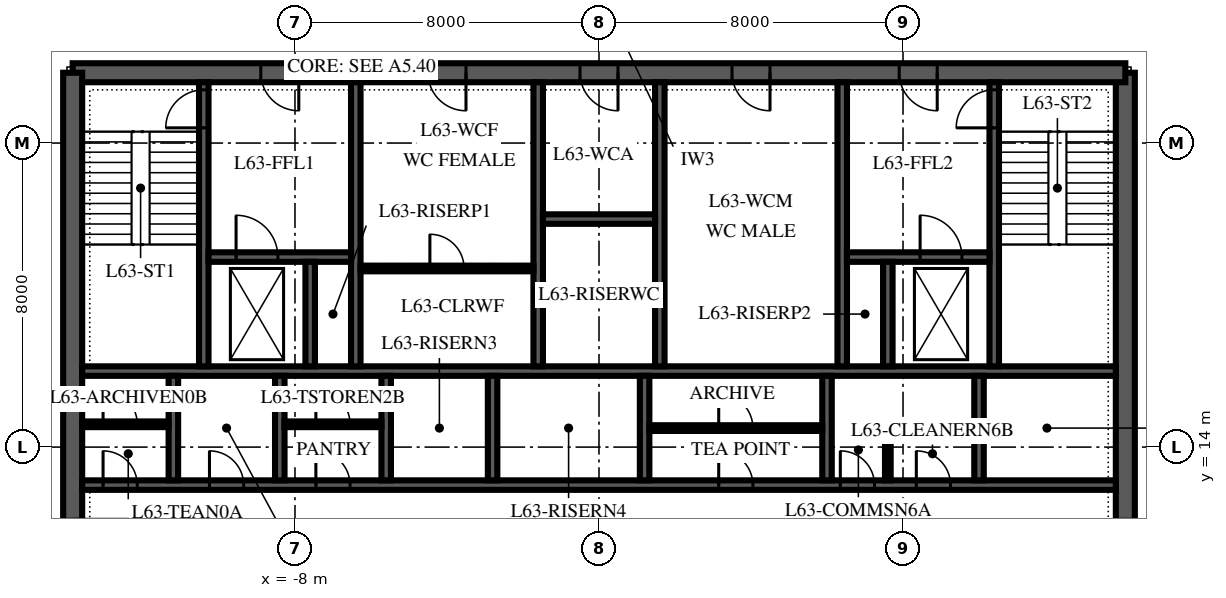
"""IFC4 building model, lengths in metres.
Left out: names, types, materials, properties, quantities, classifications, styles, units other than length and angle.
Written with IfcOpenShell. Run it as: python <this file> out.ifc"""

import sys

from ifc_helpers import new_model, si_unit, direction, frame, frame_2d, origin, place, context, subcontext, project, spatial, polyline, rectangle, outline, extrude, element, fill, save


model = new_model("IFC4")
c1 = context("Model", 3, precision=1e-05, world=origin(), true_north=direction((0.0, 1.0)))
c2 = subcontext(c1, "Body", "Model", "MODEL_VIEW")
j1 = project(units=[si_unit("LENGTHUNIT", "METRE"), si_unit("PLANEANGLEUNIT", "RADIAN")], contexts=[c1])
p1 = place(None, origin())
s1 = spatial("IfcSite", under=j1, at=p1, CompositionType="ELEMENT")
p2 = place(p1, origin())
s2 = spatial("IfcBuilding", under=s1, at=p2, CompositionType="ELEMENT")
p3 = place(p2, frame((0.0, 0.0, 272.0)))
s3 = spatial("IfcBuildingStorey", under=s2, at=p3, CompositionType="ELEMENT", Elevation=272.0)
p4 = place(p3, frame((13.85, 6.15, 0.0), z_axis=(0.0, 0.0, 1.0), x_axis=(0.0, 1.0, 0.0)))
e1 = element("IfcWall", 1, at=p4, inside=s3, PredefinedType="SHEAR", context=c2, shape_type="SweptSolid", body=[
    extrude(outline(polyline([(0.0, -0.25), (17.7, -0.25), (17.7, 0.0), (17.45, 0.0), (17.45, 0.25), (0.25, 0.25), (0.25, 0.0), (0.0, 0.0), (0.0, -0.25)])), origin(), (0.0, 0.0, 1.0), 4.0),
])
p5 = place(p4, frame((4.15, 0.0, 0.0)))
e2 = element("IfcOpeningElement", 2, at=p5, cuts=e1, PredefinedType="OPENING", context=c2, shape_type="SweptSolid", body=[
    extrude(rectangle(XDim=1.8, YDim=2.4, at=frame_2d((0.9, 1.2))), frame((0.0, 0.265, 0.0), z_axis=(0.0, -1.0, 0.0), x_axis=(1.0, 0.0, 0.0)), (0.0, 0.0, 1.0), 0.53),
])
p6 = place(p3, frame((13.85, 23.85, 0.0), z_axis=(0.0, 0.0, 1.0), x_axis=(-1.0, 0.0, 0.0)))
e3 = element("IfcWall", 3, at=p6, inside=s3, PredefinedType="SHEAR", context=c2, shape_type="SweptSolid", body=[
    extrude(rectangle(XDim=27.7, YDim=0.5, at=frame_2d((13.85, 0.0))), origin(), (0.0, 0.0, 1.0), 4.0),
])
p7 = place(p6, frame((21.75, 0.0, 0.0)))
e4 = element("IfcOpeningElement", 4, at=p7, cuts=e3, PredefinedType="OPENING", context=c2, shape_type="SweptSolid", body=[
    extrude(rectangle(XDim=1.0, YDim=2.1, at=frame_2d((0.5, 1.05))), frame((0.0, 0.265, 0.0), z_axis=(0.0, -1.0, 0.0), x_axis=(1.0, 0.0, 0.0)), (0.0, 0.0, 1.0), 0.53),
])
p8 = place(p6, frame((4.95, 0.0, 0.0)))
e5 = element("IfcOpeningElement", 5, at=p8, cuts=e3, PredefinedType="OPENING", context=c2, shape_type="SweptSolid", body=[
    extrude(rectangle(XDim=1.0, YDim=2.1, at=frame_2d((0.5, 1.05))), frame((0.0, 0.265, 0.0), z_axis=(0.0, -1.0, 0.0), x_axis=(1.0, 0.0, 0.0)), (0.0, 0.0, 1.0), 0.53),
])
p9 = place(p6, frame((17.35, 0.0, 0.0)))
e6 = element("IfcOpeningElement", 6, at=p9, cuts=e3, PredefinedType="OPENING", context=c2, shape_type="SweptSolid", body=[
    extrude(rectangle(XDim=1.0, YDim=2.1, at=frame_2d((0.5, 1.05))), frame((0.0, 0.265, 0.0), z_axis=(0.0, -1.0, 0.0), x_axis=(1.0, 0.0, 0.0)), (0.0, 0.0, 1.0), 0.53),
])
p10 = place(p6, frame((13.35, 0.0, 0.0)))
e7 = element("IfcOpeningElement", 7, at=p10, cuts=e3, PredefinedType="OPENING", context=c2, shape_type="SweptSolid", body=[
    extrude(rectangle(XDim=1.0, YDim=2.1, at=frame_2d((0.5, 1.05))), frame((0.0, 0.265, 0.0), z_axis=(0.0, -1.0, 0.0), x_axis=(1.0, 0.0, 0.0)), (0.0, 0.0, 1.0), 0.53),
])
p11 = place(p6, frame((9.35, 0.0, 0.0)))
e8 = element("IfcOpeningElement", 8, at=p11, cuts=e3, PredefinedType="OPENING", context=c2, shape_type="SweptSolid", body=[
    extrude(rectangle(XDim=1.0, YDim=2.1, at=frame_2d((0.5, 1.05))), frame((0.0, 0.265, 0.0), z_axis=(0.0, -1.0, 0.0), x_axis=(1.0, 0.0, 0.0)), (0.0, 0.0, 1.0), 0.53),
])
p12 = place(p3, frame((-13.85, 23.85, 0.0), z_axis=(0.0, 0.0, 1.0), x_axis=(0.0, -1.0, 0.0)))
e9 = element("IfcWall", 9, at=p12, inside=s3, PredefinedType="SHEAR", context=c2, shape_type="SweptSolid", body=[
    extrude(outline(polyline([(0.0, -0.25), (17.7, -0.25), (17.7, 0.0), (17.45, 0.0), (17.45, 0.25), (0.25, 0.25), (0.25, 0.0), (0.0, 0.0), (0.0, -0.25)])), origin(), (0.0, 0.0, 1.0), 4.0),
])
p13 = place(p12, frame((11.75, 0.0, 0.0)))
e10 = element("IfcOpeningElement", 10, at=p13, cuts=e9, PredefinedType="OPENING", context=c2, shape_type="SweptSolid", body=[
    extrude(rectangle(XDim=1.8, YDim=2.4, at=frame_2d((0.9, 1.2))), frame((0.0, 0.265, 0.0), z_axis=(0.0, -1.0, 0.0), x_axis=(1.0, 0.0, 0.0)), (0.0, 0.0, 1.0), 0.53),
])
p14 = place(p3, frame((-13.6, 13.0, 0.0), z_axis=(0.0, 0.0, 1.0), x_axis=(1.0, 0.0, 0.0)))
e11 = element("IfcWall", 11, at=p14, inside=s3, PredefinedType="SHEAR", context=c2, shape_type="SweptSolid", body=[
    extrude(rectangle(XDim=27.2, YDim=0.25, at=frame_2d((13.6, 0.0))), origin(), (0.0, 0.0, 1.0), 4.0),
])
p15 = place(p14, frame((16.75, 0.0, 0.0)))
e12 = element("IfcOpeningElement", 12, at=p15, cuts=e11, PredefinedType="OPENING", context=c2, shape_type="SweptSolid", body=[
    extrude(rectangle(XDim=0.9, YDim=2.1, at=frame_2d((0.45, 1.05))), frame((0.0, 0.14, 0.0), z_axis=(0.0, -1.0, 0.0), x_axis=(1.0, 0.0, 0.0)), (0.0, 0.0, 1.0), 0.28),
])
p16 = place(p14, frame((19.95, 0.0, 0.0)))
e13 = element("IfcOpeningElement", 13, at=p16, cuts=e11, PredefinedType="OPENING", context=c2, shape_type="SweptSolid", body=[
    extrude(rectangle(XDim=0.9, YDim=2.1, at=frame_2d((0.45, 1.05))), frame((0.0, 0.14, 0.0), z_axis=(0.0, -1.0, 0.0), x_axis=(1.0, 0.0, 0.0)), (0.0, 0.0, 1.0), 0.28),
])
p17 = place(p14, frame((21.95, 0.0, 0.0)))
e14 = element("IfcOpeningElement", 14, at=p17, cuts=e11, PredefinedType="OPENING", context=c2, shape_type="SweptSolid", body=[
    extrude(rectangle(XDim=0.9, YDim=2.1, at=frame_2d((0.45, 1.05))), frame((0.0, 0.14, 0.0), z_axis=(0.0, -1.0, 0.0), x_axis=(1.0, 0.0, 0.0)), (0.0, 0.0, 1.0), 0.28),
])
p18 = place(p14, frame((0.55, 0.0, 0.0)))
e15 = element("IfcOpeningElement", 15, at=p18, cuts=e11, PredefinedType="OPENING", context=c2, shape_type="SweptSolid", body=[
    extrude(rectangle(XDim=0.9, YDim=2.1, at=frame_2d((0.45, 1.05))), frame((0.0, 0.14, 0.0), z_axis=(0.0, -1.0, 0.0), x_axis=(1.0, 0.0, 0.0)), (0.0, 0.0, 1.0), 0.28),
])
p19 = place(p14, frame((3.35, 0.0, 0.0)))
e16 = element("IfcOpeningElement", 16, at=p19, cuts=e11, PredefinedType="OPENING", context=c2, shape_type="SweptSolid", body=[
    extrude(rectangle(XDim=0.9, YDim=2.1, at=frame_2d((0.45, 1.05))), frame((0.0, 0.14, 0.0), z_axis=(0.0, -1.0, 0.0), x_axis=(1.0, 0.0, 0.0)), (0.0, 0.0, 1.0), 0.28),
])
p20 = place(p14, frame((6.15, 0.0, 0.0)))
e17 = element("IfcOpeningElement", 17, at=p20, cuts=e11, PredefinedType="OPENING", context=c2, shape_type="SweptSolid", body=[
    extrude(rectangle(XDim=0.9, YDim=2.1, at=frame_2d((0.45, 1.05))), frame((0.0, 0.14, 0.0), z_axis=(0.0, -1.0, 0.0), x_axis=(1.0, 0.0, 0.0)), (0.0, 0.0, 1.0), 0.28),
])
p21 = place(p3, frame((-13.6, 16.0, 0.0), z_axis=(0.0, 0.0, 1.0), x_axis=(1.0, 0.0, 0.0)))
e18 = element("IfcWall", 18, at=p21, inside=s3, PredefinedType="SHEAR", context=c2, shape_type="SweptSolid", body=[
    extrude(rectangle(XDim=27.2, YDim=0.25, at=frame_2d((13.6, 0.0))), origin(), (0.0, 0.0, 1.0), 4.0),
])
for number, where, z_axis, x_axis in (
    (19, (-11.2, 13.125, 0.0), (0.0, 0.0, 1.0), (0.0, 1.0, 0.0)),
    (20, (-8.4, 13.125, 0.0), (0.0, 0.0, 1.0), (0.0, 1.0, 0.0)),
    (21, (-5.6, 13.125, 0.0), (0.0, 0.0, 1.0), (0.0, 1.0, 0.0)),
    (22, (-2.8, 13.125, 0.0), (0.0, 0.0, 1.0), (0.0, 1.0, 0.0)),
    (23, (1.2, 13.125, 0.0), (0.0, 0.0, 1.0), (0.0, 1.0, 0.0)),
    (24, (6.0, 13.125, 0.0), (0.0, 0.0, 1.0), (0.0, 1.0, 0.0)),
    (25, (10.0, 13.125, 0.0), (0.0, 0.0, 1.0), (0.0, 1.0, 0.0)),
):
    element("IfcWall", number, at=place(p3, frame(where, z_axis=z_axis, x_axis=x_axis)), inside=s3, PredefinedType="SHEAR", context=c2, shape_type="SweptSolid", body=[
        extrude(rectangle(XDim=2.75, YDim=0.25, at=frame_2d((1.375, 0.0))), origin(), (0.0, 0.0, 1.0), 4.0),
    ])
p22 = place(p3, frame((-10.4, 16.125, 0.0), z_axis=(0.0, 0.0, 1.0), x_axis=(0.0, 1.0, 0.0)))
e26 = element("IfcWall", 26, at=p22, inside=s3, PredefinedType="SHEAR", context=c2, shape_type="SweptSolid", body=[
    extrude(rectangle(XDim=7.475, YDim=0.25, at=frame_2d((3.738, 0.0))), origin(), (0.0, 0.0, 1.0), 4.0),
])
p23 = place(p22, frame((6.275, 0.0, 0.0)))
e27 = element("IfcOpeningElement", 27, at=p23, cuts=e26, PredefinedType="OPENING", context=c2, shape_type="SweptSolid", body=[
    extrude(rectangle(XDim=1.0, YDim=2.1, at=frame_2d((0.5, 1.05))), frame((0.0, 0.14, 0.0), z_axis=(0.0, -1.0, 0.0), x_axis=(1.0, 0.0, 0.0)), (0.0, 0.0, 1.0), 0.28),
])
for number, where, z_axis, x_axis in (
    (28, (-6.4, 16.125, 0.0), (0.0, 0.0, 1.0), (0.0, 1.0, 0.0)),
    (29, (-1.6, 16.125, 0.0), (0.0, 0.0, 1.0), (0.0, 1.0, 0.0)),
    (30, (1.6, 16.125, 0.0), (0.0, 0.0, 1.0), (0.0, 1.0, 0.0)),
    (31, (6.4, 16.125, 0.0), (0.0, 0.0, 1.0), (0.0, 1.0, 0.0)),
):
    element("IfcWall", number, at=place(p3, frame(where, z_axis=z_axis, x_axis=x_axis)), inside=s3, PredefinedType="SHEAR", context=c2, shape_type="SweptSolid", body=[
        extrude(rectangle(XDim=7.475, YDim=0.25, at=frame_2d((3.738, 0.0))), origin(), (0.0, 0.0, 1.0), 4.0),
    ])
p24 = place(p3, frame((10.4, 16.125, 0.0), z_axis=(0.0, 0.0, 1.0), x_axis=(0.0, 1.0, 0.0)))
e32 = element("IfcWall", 32, at=p24, inside=s3, PredefinedType="SHEAR", context=c2, shape_type="SweptSolid", body=[
    extrude(rectangle(XDim=7.475, YDim=0.25, at=frame_2d((3.738, 0.0))), origin(), (0.0, 0.0, 1.0), 4.0),
])
p25 = place(p24, frame((6.275, 0.0, 0.0)))
e33 = element("IfcOpeningElement", 33, at=p25, cuts=e32, PredefinedType="OPENING", context=c2, shape_type="SweptSolid", body=[
    extrude(rectangle(XDim=1.0, YDim=2.1, at=frame_2d((0.5, 1.05))), frame((0.0, 0.14, 0.0), z_axis=(0.0, -1.0, 0.0), x_axis=(1.0, 0.0, 0.0)), (0.0, 0.0, 1.0), 0.28),
])
p26 = place(p3, frame((-10.275, 19.0, 0.0), z_axis=(0.0, 0.0, 1.0), x_axis=(1.0, 0.0, 0.0)))
e34 = element("IfcWall", 34, at=p26, inside=s3, PredefinedType="SHEAR", context=c2, shape_type="SweptSolid", body=[
    extrude(rectangle(XDim=3.75, YDim=0.25, at=frame_2d((1.875, 0.0))), origin(), (0.0, 0.0, 1.0), 4.0),
])
p27 = place(p26, frame((0.725, 0.0, 0.0)))
e35 = element("IfcOpeningElement", 35, at=p27, cuts=e34, PredefinedType="OPENING", context=c2, shape_type="SweptSolid", body=[
    extrude(rectangle(XDim=1.1, YDim=2.1, at=frame_2d((0.55, 1.05))), frame((0.0, 0.14, 0.0), z_axis=(0.0, -1.0, 0.0), x_axis=(1.0, 0.0, 0.0)), (0.0, 0.0, 1.0), 0.28),
])
p28 = place(p3, frame((6.525, 19.0, 0.0), z_axis=(0.0, 0.0, 1.0), x_axis=(1.0, 0.0, 0.0)))
e36 = element("IfcWall", 36, at=p28, inside=s3, PredefinedType="SHEAR", context=c2, shape_type="SweptSolid", body=[
    extrude(rectangle(XDim=3.75, YDim=0.25, at=frame_2d((1.875, 0.0))), origin(), (0.0, 0.0, 1.0), 4.0),
])
p29 = place(p28, frame((1.925, 0.0, 0.0)))
e37 = element("IfcOpeningElement", 37, at=p29, cuts=e36, PredefinedType="OPENING", context=c2, shape_type="SweptSolid", body=[
    extrude(rectangle(XDim=1.1, YDim=2.1, at=frame_2d((0.55, 1.05))), frame((0.0, 0.14, 0.0), z_axis=(0.0, -1.0, 0.0), x_axis=(1.0, 0.0, 0.0)), (0.0, 0.0, 1.0), 0.28),
])
for number, where, z_axis, x_axis in (
    (38, (-7.6, 16.125, 0.0), (0.0, 0.0, 1.0), (0.0, 1.0, 0.0)),
    (39, (7.6, 16.125, 0.0), (0.0, 0.0, 1.0), (0.0, 1.0, 0.0)),
):
    element("IfcWall", number, at=place(p3, frame(where, z_axis=z_axis, x_axis=x_axis)), inside=s3, PredefinedType="SHEAR", context=c2, shape_type="SweptSolid", body=[
        extrude(rectangle(XDim=2.75, YDim=0.25, at=frame_2d((1.375, 0.0))), origin(), (0.0, 0.0, 1.0), 4.0),
    ])
p30 = place(p3, frame((-1.475, 20.0, 0.0), z_axis=(0.0, 0.0, 1.0), x_axis=(1.0, 0.0, 0.0)))
e40 = element("IfcWall", 40, at=p30, inside=s3, PredefinedType="SHEAR", context=c2, shape_type="SweptSolid", body=[
    extrude(rectangle(XDim=2.95, YDim=0.25, at=frame_2d((1.475, 0.0))), origin(), (0.0, 0.0, 1.0), 4.0),
])
p31 = place(p3, frame((-6.275, 18.7, 0.0), z_axis=(0.0, 0.0, 1.0), x_axis=(1.0, 0.0, 0.0)))
e41 = element("IfcWall", 41, at=p31, inside=s3, PredefinedType="PARTITIONING", context=c2, shape_type="SweptSolid", body=[
    extrude(rectangle(XDim=4.55, YDim=0.15, at=frame_2d((2.275, 0.0))), origin(), (0.0, 0.0, 1.0), 3.85),
])
p32 = place(p31, frame((1.825, 0.0, 0.0)))
e42 = element("IfcOpeningElement", 42, at=p32, cuts=e41, PredefinedType="OPENING", context=c2, shape_type="SweptSolid", body=[
    extrude(rectangle(XDim=0.9, YDim=2.1, at=frame_2d((0.45, 1.05))), frame((0.0, 0.09, 0.0), z_axis=(0.0, -1.0, 0.0), x_axis=(1.0, 0.0, 0.0)), (0.0, 0.0, 1.0), 0.18),
])
p33 = place(p3, frame((1.325, 14.5, 0.0), z_axis=(0.0, 0.0, 1.0), x_axis=(1.0, 0.0, 0.0)))
e43 = element("IfcWall", 43, at=p33, inside=s3, PredefinedType="PARTITIONING", context=c2, shape_type="SweptSolid", body=[
    extrude(rectangle(XDim=4.55, YDim=0.15, at=frame_2d((2.275, 0.0))), origin(), (0.0, 0.0, 1.0), 3.85),
])
p34 = place(p33, frame((1.825, 0.0, 0.0)))
e44 = element("IfcOpeningElement", 44, at=p34, cuts=e43, PredefinedType="OPENING", context=c2, shape_type="SweptSolid", body=[
    extrude(rectangle(XDim=0.9, YDim=2.1, at=frame_2d((0.45, 1.05))), frame((0.0, 0.09, 0.0), z_axis=(0.0, -1.0, 0.0), x_axis=(1.0, 0.0, 0.0)), (0.0, 0.0, 1.0), 0.18),
])
p35 = place(p3, frame((7.6, 13.125, 0.0), z_axis=(0.0, 0.0, 1.0), x_axis=(0.0, 1.0, 0.0)))
e45 = element("IfcWall", 45, at=p35, inside=s3, PredefinedType="PARTITIONING", context=c2, shape_type="SweptSolid", body=[
    extrude(rectangle(XDim=1.55, YDim=0.15, at=frame_2d((0.775, 0.0))), origin(), (0.0, 0.0, 1.0), 3.85),
])
p36 = place(p3, frame((7.675, 14.6, 0.0), z_axis=(0.0, 0.0, 1.0), x_axis=(1.0, 0.0, 0.0)))
e46 = element("IfcWall", 46, at=p36, inside=s3, PredefinedType="PARTITIONING", context=c2, shape_type="SweptSolid", body=[
    extrude(rectangle(XDim=2.2, YDim=0.15, at=frame_2d((1.1, 0.0))), origin(), (0.0, 0.0, 1.0), 3.85),
])
p37 = place(p3, frame((-13.6, 14.6, 0.0), z_axis=(0.0, 0.0, 1.0), x_axis=(1.0, 0.0, 0.0)))
e47 = element("IfcWall", 47, at=p37, inside=s3, PredefinedType="PARTITIONING", context=c2, shape_type="SweptSolid", body=[
    extrude(rectangle(XDim=2.275, YDim=0.15, at=frame_2d((1.138, 0.0))), origin(), (0.0, 0.0, 1.0), 3.85),
])
p38 = place(p37, frame((0.55, 0.0, 0.0)))
e48 = element("IfcOpeningElement", 48, at=p38, cuts=e47, PredefinedType="OPENING", context=c2, shape_type="SweptSolid", body=[
    extrude(rectangle(XDim=0.9, YDim=2.1, at=frame_2d((0.45, 1.05))), frame((0.0, 0.09, 0.0), z_axis=(0.0, -1.0, 0.0), x_axis=(1.0, 0.0, 0.0)), (0.0, 0.0, 1.0), 0.18),
])
p39 = place(p3, frame((-8.275, 14.6, 0.0), z_axis=(0.0, 0.0, 1.0), x_axis=(1.0, 0.0, 0.0)))
e49 = element("IfcWall", 49, at=p39, inside=s3, PredefinedType="PARTITIONING", context=c2, shape_type="SweptSolid", body=[
    extrude(rectangle(XDim=2.55, YDim=0.15, at=frame_2d((1.275, 0.0))), origin(), (0.0, 0.0, 1.0), 3.85),
])
p40 = place(p39, frame((0.825, 0.0, 0.0)))
e50 = element("IfcOpeningElement", 50, at=p40, cuts=e49, PredefinedType="OPENING", context=c2, shape_type="SweptSolid", body=[
    extrude(rectangle(XDim=0.9, YDim=2.1, at=frame_2d((0.45, 1.05))), frame((0.0, 0.09, 0.0), z_axis=(0.0, -1.0, 0.0), x_axis=(1.0, 0.0, 0.0)), (0.0, 0.0, 1.0), 0.18),
])
p41 = place(p7, origin())
e51 = element("IfcDoor", 51, at=p41, inside=s3, OperationType="SINGLE_SWING_RIGHT", PredefinedType="DOOR", context=c2, shape_type="SweptSolid", body=[
    extrude(rectangle(XDim=1.0, YDim=2.1, at=frame_2d((0.5, 1.05))), frame((0.0, 0.25, 0.0), z_axis=(0.0, -1.0, 0.0), x_axis=(1.0, 0.0, 0.0)), (0.0, 0.0, 1.0), 0.5),
])
fill(e4, e51)
p42 = place(p8, origin())
e52 = element("IfcDoor", 52, at=p42, inside=s3, OperationType="SINGLE_SWING_RIGHT", PredefinedType="DOOR", context=c2, shape_type="SweptSolid", body=[
    extrude(rectangle(XDim=1.0, YDim=2.1, at=frame_2d((0.5, 1.05))), frame((0.0, 0.25, 0.0), z_axis=(0.0, -1.0, 0.0), x_axis=(1.0, 0.0, 0.0)), (0.0, 0.0, 1.0), 0.5),
])
fill(e5, e52)
p43 = place(p9, origin())
e53 = element("IfcDoor", 53, at=p43, inside=s3, OperationType="SINGLE_SWING_LEFT", PredefinedType="DOOR", context=c2, shape_type="SweptSolid", body=[
    extrude(rectangle(XDim=1.0, YDim=2.1, at=frame_2d((0.5, 1.05))), frame((0.0, 0.25, 0.0), z_axis=(0.0, -1.0, 0.0), x_axis=(1.0, 0.0, 0.0)), (0.0, 0.0, 1.0), 0.5),
])
fill(e6, e53)
p44 = place(p10, origin())
e54 = element("IfcDoor", 54, at=p44, inside=s3, OperationType="SINGLE_SWING_LEFT", PredefinedType="DOOR", context=c2, shape_type="SweptSolid", body=[
    extrude(rectangle(XDim=1.0, YDim=2.1, at=frame_2d((0.5, 1.05))), frame((0.0, 0.25, 0.0), z_axis=(0.0, -1.0, 0.0), x_axis=(1.0, 0.0, 0.0)), (0.0, 0.0, 1.0), 0.5),
])
fill(e7, e54)
p45 = place(p11, origin())
e55 = element("IfcDoor", 55, at=p45, inside=s3, OperationType="SINGLE_SWING_LEFT", PredefinedType="DOOR", context=c2, shape_type="SweptSolid", body=[
    extrude(rectangle(XDim=1.0, YDim=2.1, at=frame_2d((0.5, 1.05))), frame((0.0, 0.25, 0.0), z_axis=(0.0, -1.0, 0.0), x_axis=(1.0, 0.0, 0.0)), (0.0, 0.0, 1.0), 0.5),
])
fill(e8, e55)
p46 = place(p23, origin())
e56 = element("IfcDoor", 56, at=p46, inside=s3, OperationType="SINGLE_SWING_LEFT", PredefinedType="DOOR", context=c2, shape_type="SweptSolid", body=[
    extrude(rectangle(XDim=1.0, YDim=2.1, at=frame_2d((0.5, 1.05))), frame((0.0, 0.125, 0.0), z_axis=(0.0, -1.0, 0.0), x_axis=(1.0, 0.0, 0.0)), (0.0, 0.0, 1.0), 0.25),
])
fill(e27, e56)
p47 = place(p25, origin())
e57 = element("IfcDoor", 57, at=p47, inside=s3, OperationType="SINGLE_SWING_LEFT", PredefinedType="DOOR", context=c2, shape_type="SweptSolid", body=[
    extrude(rectangle(XDim=1.0, YDim=2.1, at=frame_2d((0.5, 1.05))), frame((0.0, 0.125, 0.0), z_axis=(0.0, -1.0, 0.0), x_axis=(1.0, 0.0, 0.0)), (0.0, 0.0, 1.0), 0.25),
])
fill(e33, e57)
p48 = place(p29, origin())
e58 = element("IfcDoor", 58, at=p48, inside=s3, OperationType="SLIDING_TO_RIGHT", PredefinedType="DOOR", context=c2, shape_type="SweptSolid", body=[
    extrude(rectangle(XDim=1.1, YDim=2.1, at=frame_2d((0.55, 1.05))), frame((0.0, 0.125, 0.0), z_axis=(0.0, -1.0, 0.0), x_axis=(1.0, 0.0, 0.0)), (0.0, 0.0, 1.0), 0.25),
])
fill(e37, e58)
p49 = place(p27, origin())
e59 = element("IfcDoor", 59, at=p49, inside=s3, OperationType="SLIDING_TO_RIGHT", PredefinedType="DOOR", context=c2, shape_type="SweptSolid", body=[
    extrude(rectangle(XDim=1.1, YDim=2.1, at=frame_2d((0.55, 1.05))), frame((0.0, 0.125, 0.0), z_axis=(0.0, -1.0, 0.0), x_axis=(1.0, 0.0, 0.0)), (0.0, 0.0, 1.0), 0.25),
])
fill(e35, e59)
p50 = place(p15, origin())
e60 = element("IfcDoor", 60, at=p50, inside=s3, OperationType="SINGLE_SWING_LEFT", PredefinedType="DOOR", context=c2, shape_type="SweptSolid", body=[
    extrude(rectangle(XDim=0.9, YDim=2.1, at=frame_2d((0.45, 1.05))), frame((0.0, 0.125, 0.0), z_axis=(0.0, -1.0, 0.0), x_axis=(1.0, 0.0, 0.0)), (0.0, 0.0, 1.0), 0.25),
])
fill(e12, e60)
p51 = place(p34, origin())
e61 = element("IfcDoor", 61, at=p51, inside=s3, OperationType="SINGLE_SWING_LEFT", PredefinedType="DOOR", context=c2, shape_type="SweptSolid", body=[
    extrude(rectangle(XDim=0.9, YDim=2.1, at=frame_2d((0.45, 1.05))), frame((0.0, 0.075, 0.0), z_axis=(0.0, -1.0, 0.0), x_axis=(1.0, 0.0, 0.0)), (0.0, 0.0, 1.0), 0.149),
])
fill(e44, e61)
p52 = place(p16, origin())
e62 = element("IfcDoor", 62, at=p52, inside=s3, OperationType="SINGLE_SWING_LEFT", PredefinedType="DOOR", context=c2, shape_type="SweptSolid", body=[
    extrude(rectangle(XDim=0.9, YDim=2.1, at=frame_2d((0.45, 1.05))), frame((0.0, 0.125, 0.0), z_axis=(0.0, -1.0, 0.0), x_axis=(1.0, 0.0, 0.0)), (0.0, 0.0, 1.0), 0.25),
])
fill(e13, e62)
p53 = place(p17, origin())
e63 = element("IfcDoor", 63, at=p53, inside=s3, OperationType="SINGLE_SWING_LEFT", PredefinedType="DOOR", context=c2, shape_type="SweptSolid", body=[
    extrude(rectangle(XDim=0.9, YDim=2.1, at=frame_2d((0.45, 1.05))), frame((0.0, 0.125, 0.0), z_axis=(0.0, -1.0, 0.0), x_axis=(1.0, 0.0, 0.0)), (0.0, 0.0, 1.0), 0.25),
])
fill(e14, e63)
p54 = place(p18, origin())
e64 = element("IfcDoor", 64, at=p54, inside=s3, OperationType="SINGLE_SWING_LEFT", PredefinedType="DOOR", context=c2, shape_type="SweptSolid", body=[
    extrude(rectangle(XDim=0.9, YDim=2.1, at=frame_2d((0.45, 1.05))), frame((0.0, 0.125, 0.0), z_axis=(0.0, -1.0, 0.0), x_axis=(1.0, 0.0, 0.0)), (0.0, 0.0, 1.0), 0.25),
])
fill(e15, e64)
p55 = place(p38, origin())
e65 = element("IfcDoor", 65, at=p55, inside=s3, OperationType="SINGLE_SWING_LEFT", PredefinedType="DOOR", context=c2, shape_type="SweptSolid", body=[
    extrude(rectangle(XDim=0.9, YDim=2.1, at=frame_2d((0.45, 1.05))), frame((0.0, 0.075, 0.0), z_axis=(0.0, -1.0, 0.0), x_axis=(1.0, 0.0, 0.0)), (0.0, 0.0, 1.0), 0.149),
])
fill(e48, e65)
p56 = place(p19, origin())
e66 = element("IfcDoor", 66, at=p56, inside=s3, OperationType="SINGLE_SWING_LEFT", PredefinedType="DOOR", context=c2, shape_type="SweptSolid", body=[
    extrude(rectangle(XDim=0.9, YDim=2.1, at=frame_2d((0.45, 1.05))), frame((0.0, 0.125, 0.0), z_axis=(0.0, -1.0, 0.0), x_axis=(1.0, 0.0, 0.0)), (0.0, 0.0, 1.0), 0.25),
])
fill(e16, e66)
p57 = place(p20, origin())
e67 = element("IfcDoor", 67, at=p57, inside=s3, OperationType="SINGLE_SWING_LEFT", PredefinedType="DOOR", context=c2, shape_type="SweptSolid", body=[
    extrude(rectangle(XDim=0.9, YDim=2.1, at=frame_2d((0.45, 1.05))), frame((0.0, 0.125, 0.0), z_axis=(0.0, -1.0, 0.0), x_axis=(1.0, 0.0, 0.0)), (0.0, 0.0, 1.0), 0.25),
])
fill(e17, e67)
p58 = place(p40, origin())
e68 = element("IfcDoor", 68, at=p58, inside=s3, OperationType="SINGLE_SWING_LEFT", PredefinedType="DOOR", context=c2, shape_type="SweptSolid", body=[
    extrude(rectangle(XDim=0.9, YDim=2.1, at=frame_2d((0.45, 1.05))), frame((0.0, 0.075, 0.0), z_axis=(0.0, -1.0, 0.0), x_axis=(1.0, 0.0, 0.0)), (0.0, 0.0, 1.0), 0.149),
])
fill(e50, e68)
p59 = place(p32, origin())
e69 = element("IfcDoor", 69, at=p59, inside=s3, OperationType="SINGLE_SWING_LEFT", PredefinedType="DOOR", context=c2, shape_type="SweptSolid", body=[
    extrude(rectangle(XDim=0.9, YDim=2.1, at=frame_2d((0.45, 1.05))), frame((0.0, 0.075, 0.0), z_axis=(0.0, -1.0, 0.0), x_axis=(1.0, 0.0, 0.0)), (0.0, 0.0, 1.0), 0.149),
])
fill(e42, e69)
save(model, sys.argv[1])
